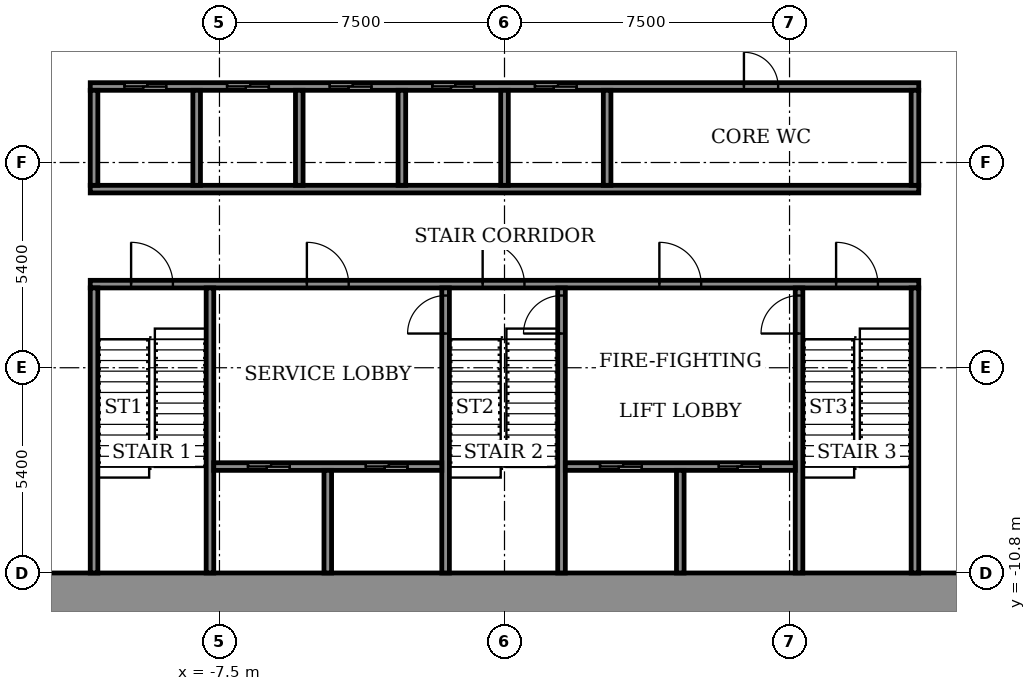
"""IFC4 building model, lengths in metres.
Left out: names, types, materials, properties, quantities, classifications, styles, units other than length and angle.
Written with IfcOpenShell. Run it as: python <this file> out.ifc"""

import sys

from ifc_helpers import new_model, si_unit, direction, frame, frame_2d, origin, place, context, subcontext, project, spatial, rectangle, extrude, element, fill, save


model = new_model("IFC4")
c1 = context("Model", 3, precision=1e-05, world=origin(), true_north=direction((0.0, 1.0)))
c2 = subcontext(c1, "Body", "Model", "MODEL_VIEW")
j1 = project(units=[si_unit("LENGTHUNIT", "METRE"), si_unit("PLANEANGLEUNIT", "RADIAN")], contexts=[c1])
p1 = place(None, origin())
s1 = spatial("IfcSite", under=j1, at=p1, CompositionType="ELEMENT")
p2 = place(p1, origin())
s2 = spatial("IfcBuilding", under=s1, at=p2, CompositionType="ELEMENT")
p3 = place(p2, frame((0.0, 0.0, 20.5)))
s3 = spatial("IfcBuildingStorey", under=s2, at=p3, CompositionType="ELEMENT", Elevation=20.5)
p4 = place(p3, frame((-15.0, -11.4, 0.0), z_axis=(0.0, 0.0, 1.0), x_axis=(1.0, 0.0, 0.0)))
e1 = element("IfcWall", 1, at=p4, inside=s3, PredefinedType="SHEAR", context=c2, shape_type="SweptSolid", body=[
    extrude(rectangle(XDim=30.0, YDim=1.2, at=frame_2d((15.0, 0.0))), origin(), (0.0, 0.0, 1.0), 4.5),
])
p5 = place(p3, frame((-10.9, -3.2, 0.0), z_axis=(0.0, 0.0, 1.0), x_axis=(1.0, 0.0, 0.0)))
e2 = element("IfcWall", 2, at=p5, inside=s3, PredefinedType="SHEAR", context=c2, shape_type="SweptSolid", body=[
    extrude(rectangle(XDim=21.8, YDim=0.2, at=frame_2d((10.9, 0.0))), origin(), (0.0, 0.0, 1.0), 3.95),
])
p6 = place(p5, frame((1.075, 0.0, 0.0)))
e3 = element("IfcOpeningElement", 3, at=p6, cuts=e2, PredefinedType="OPENING", context=c2, shape_type="SweptSolid", body=[
    extrude(rectangle(XDim=1.1, YDim=2.1, at=frame_2d((0.55, 1.05))), frame((0.0, 0.11, 0.0), z_axis=(0.0, -1.0, 0.0), x_axis=(1.0, 0.0, 0.0)), (0.0, 0.0, 1.0), 0.22),
])
p7 = place(p5, frame((10.325, 0.0, 0.0)))
e4 = element("IfcOpeningElement", 4, at=p7, cuts=e2, PredefinedType="OPENING", context=c2, shape_type="SweptSolid", body=[
    extrude(rectangle(XDim=1.1, YDim=2.1, at=frame_2d((0.55, 1.05))), frame((0.0, 0.11, 0.0), z_axis=(0.0, -1.0, 0.0), x_axis=(1.0, 0.0, 0.0)), (0.0, 0.0, 1.0), 0.22),
])
p8 = place(p5, frame((19.625, 0.0, 0.0)))
e5 = element("IfcOpeningElement", 5, at=p8, cuts=e2, PredefinedType="OPENING", context=c2, shape_type="SweptSolid", body=[
    extrude(rectangle(XDim=1.1, YDim=2.1, at=frame_2d((0.55, 1.05))), frame((0.0, 0.11, 0.0), z_axis=(0.0, -1.0, 0.0), x_axis=(1.0, 0.0, 0.0)), (0.0, 0.0, 1.0), 0.22),
])
p9 = place(p5, frame((5.7, 0.0, 0.0)))
e6 = element("IfcOpeningElement", 6, at=p9, cuts=e2, PredefinedType="OPENING", context=c2, shape_type="SweptSolid", body=[
    extrude(rectangle(XDim=1.1, YDim=2.1, at=frame_2d((0.55, 1.05))), frame((0.0, 0.11, 0.0), z_axis=(0.0, -1.0, 0.0), x_axis=(1.0, 0.0, 0.0)), (0.0, 0.0, 1.0), 0.22),
])
p10 = place(p5, frame((14.975, 0.0, 0.0)))
e7 = element("IfcOpeningElement", 7, at=p10, cuts=e2, PredefinedType="OPENING", context=c2, shape_type="SweptSolid", body=[
    extrude(rectangle(XDim=1.1, YDim=2.1, at=frame_2d((0.55, 1.05))), frame((0.0, 0.11, 0.0), z_axis=(0.0, -1.0, 0.0), x_axis=(1.0, 0.0, 0.0)), (0.0, 0.0, 1.0), 0.22),
])
p11 = place(p3, frame((-10.9, -0.7, 0.0), z_axis=(0.0, 0.0, 1.0), x_axis=(1.0, 0.0, 0.0)))
e8 = element("IfcWall", 8, at=p11, inside=s3, PredefinedType="SHEAR", context=c2, shape_type="SweptSolid", body=[
    extrude(rectangle(XDim=21.8, YDim=0.2, at=frame_2d((10.9, 0.0))), origin(), (0.0, 0.0, 1.0), 3.95),
])
p12 = place(p3, frame((-10.9, 2.0, 0.0), z_axis=(0.0, 0.0, 1.0), x_axis=(1.0, 0.0, 0.0)))
e9 = element("IfcWall", 9, at=p12, inside=s3, PredefinedType="SHEAR", context=c2, shape_type="SweptSolid", body=[
    extrude(rectangle(XDim=21.8, YDim=0.2, at=frame_2d((10.9, 0.0))), origin(), (0.0, 0.0, 1.0), 3.95),
])
p13 = place(p12, frame((0.9, 0.0, 0.0)))
e10 = element("IfcOpeningElement", 10, at=p13, cuts=e9, PredefinedType="OPENING", context=c2, shape_type="SweptSolid", body=[
    extrude(rectangle(XDim=1.1, YDim=2.1, at=frame_2d((0.55, 1.05))), frame((0.0, 0.11, 0.0), z_axis=(0.0, -1.0, 0.0), x_axis=(1.0, 0.0, 0.0)), (0.0, 0.0, 1.0), 0.22),
])
p14 = place(p12, frame((3.6, 0.0, 0.0)))
e11 = element("IfcOpeningElement", 11, at=p14, cuts=e9, PredefinedType="OPENING", context=c2, shape_type="SweptSolid", body=[
    extrude(rectangle(XDim=1.1, YDim=2.1, at=frame_2d((0.55, 1.05))), frame((0.0, 0.11, 0.0), z_axis=(0.0, -1.0, 0.0), x_axis=(1.0, 0.0, 0.0)), (0.0, 0.0, 1.0), 0.22),
])
p15 = place(p12, frame((6.3, 0.0, 0.0)))
e12 = element("IfcOpeningElement", 12, at=p15, cuts=e9, PredefinedType="OPENING", context=c2, shape_type="SweptSolid", body=[
    extrude(rectangle(XDim=1.1, YDim=2.1, at=frame_2d((0.55, 1.05))), frame((0.0, 0.11, 0.0), z_axis=(0.0, -1.0, 0.0), x_axis=(1.0, 0.0, 0.0)), (0.0, 0.0, 1.0), 0.22),
])
p16 = place(p12, frame((9.0, 0.0, 0.0)))
e13 = element("IfcOpeningElement", 13, at=p16, cuts=e9, PredefinedType="OPENING", context=c2, shape_type="SweptSolid", body=[
    extrude(rectangle(XDim=1.1, YDim=2.1, at=frame_2d((0.55, 1.05))), frame((0.0, 0.11, 0.0), z_axis=(0.0, -1.0, 0.0), x_axis=(1.0, 0.0, 0.0)), (0.0, 0.0, 1.0), 0.22),
])
p17 = place(p12, frame((11.7, 0.0, 0.0)))
e14 = element("IfcOpeningElement", 14, at=p17, cuts=e9, PredefinedType="OPENING", context=c2, shape_type="SweptSolid", body=[
    extrude(rectangle(XDim=1.1, YDim=2.1, at=frame_2d((0.55, 1.05))), frame((0.0, 0.11, 0.0), z_axis=(0.0, -1.0, 0.0), x_axis=(1.0, 0.0, 0.0)), (0.0, 0.0, 1.0), 0.22),
])
p18 = place(p12, frame((17.2, 0.0, 0.0)))
e15 = element("IfcOpeningElement", 15, at=p18, cuts=e9, PredefinedType="OPENING", context=c2, shape_type="SweptSolid", body=[
    extrude(rectangle(XDim=0.9, YDim=2.1, at=frame_2d((0.45, 1.05))), frame((0.0, 0.11, 0.0), z_axis=(0.0, -1.0, 0.0), x_axis=(1.0, 0.0, 0.0)), (0.0, 0.0, 1.0), 0.22),
])
for number, where, z_axis, x_axis in (
    (16, (-10.8, -10.8, 0.0), (0.0, 0.0, 1.0), (0.0, 1.0, 0.0)),
    (17, (-7.75, -10.8, 0.0), (0.0, 0.0, 1.0), (0.0, 1.0, 0.0)),
):
    element("IfcWall", number, at=place(p3, frame(where, z_axis=z_axis, x_axis=x_axis)), inside=s3, PredefinedType="SHEAR", context=c2, shape_type="SweptSolid", body=[
        extrude(rectangle(XDim=7.5, YDim=0.2, at=frame_2d((3.75, 0.0))), origin(), (0.0, 0.0, 1.0), 3.95),
    ])
p19 = place(p3, frame((-1.55, -10.8, 0.0), z_axis=(0.0, 0.0, 1.0), x_axis=(0.0, 1.0, 0.0)))
e18 = element("IfcWall", 18, at=p19, inside=s3, PredefinedType="SHEAR", context=c2, shape_type="SweptSolid", body=[
    extrude(rectangle(XDim=7.5, YDim=0.2, at=frame_2d((3.75, 0.0))), origin(), (0.0, 0.0, 1.0), 3.95),
])
p20 = place(p19, frame((6.3, 0.0, 0.0)))
e19 = element("IfcOpeningElement", 19, at=p20, cuts=e18, PredefinedType="OPENING", context=c2, shape_type="SweptSolid", body=[
    extrude(rectangle(XDim=1.0, YDim=2.1, at=frame_2d((0.5, 1.05))), frame((0.0, 0.11, 0.0), z_axis=(0.0, -1.0, 0.0), x_axis=(1.0, 0.0, 0.0)), (0.0, 0.0, 1.0), 0.22),
])
p21 = place(p3, frame((1.5, -10.8, 0.0), z_axis=(0.0, 0.0, 1.0), x_axis=(0.0, 1.0, 0.0)))
e20 = element("IfcWall", 20, at=p21, inside=s3, PredefinedType="SHEAR", context=c2, shape_type="SweptSolid", body=[
    extrude(rectangle(XDim=7.5, YDim=0.2, at=frame_2d((3.75, 0.0))), origin(), (0.0, 0.0, 1.0), 3.95),
])
p22 = place(p21, frame((6.3, 0.0, 0.0)))
e21 = element("IfcOpeningElement", 21, at=p22, cuts=e20, PredefinedType="OPENING", context=c2, shape_type="SweptSolid", body=[
    extrude(rectangle(XDim=1.0, YDim=2.1, at=frame_2d((0.5, 1.05))), frame((0.0, 0.11, 0.0), z_axis=(0.0, -1.0, 0.0), x_axis=(1.0, 0.0, 0.0)), (0.0, 0.0, 1.0), 0.22),
])
p23 = place(p3, frame((7.75, -10.8, 0.0), z_axis=(0.0, 0.0, 1.0), x_axis=(0.0, 1.0, 0.0)))
e22 = element("IfcWall", 22, at=p23, inside=s3, PredefinedType="SHEAR", context=c2, shape_type="SweptSolid", body=[
    extrude(rectangle(XDim=7.5, YDim=0.2, at=frame_2d((3.75, 0.0))), origin(), (0.0, 0.0, 1.0), 3.95),
])
p24 = place(p23, frame((6.3, 0.0, 0.0)))
e23 = element("IfcOpeningElement", 23, at=p24, cuts=e22, PredefinedType="OPENING", context=c2, shape_type="SweptSolid", body=[
    extrude(rectangle(XDim=1.0, YDim=2.1, at=frame_2d((0.5, 1.05))), frame((0.0, 0.11, 0.0), z_axis=(0.0, -1.0, 0.0), x_axis=(1.0, 0.0, 0.0)), (0.0, 0.0, 1.0), 0.22),
])
p25 = place(p3, frame((10.8, -10.8, 0.0), z_axis=(0.0, 0.0, 1.0), x_axis=(0.0, 1.0, 0.0)))
e24 = element("IfcWall", 24, at=p25, inside=s3, PredefinedType="SHEAR", context=c2, shape_type="SweptSolid", body=[
    extrude(rectangle(XDim=7.5, YDim=0.2, at=frame_2d((3.75, 0.0))), origin(), (0.0, 0.0, 1.0), 3.95),
])
p26 = place(p3, frame((-7.65, -8.0, 0.0), z_axis=(0.0, 0.0, 1.0), x_axis=(1.0, 0.0, 0.0)))
e25 = element("IfcWall", 25, at=p26, inside=s3, PredefinedType="SHEAR", context=c2, shape_type="SweptSolid", body=[
    extrude(rectangle(XDim=6.0, YDim=0.2, at=frame_2d((3.0, 0.0))), origin(), (0.0, 0.0, 1.0), 3.95),
])
p27 = place(p26, frame((0.9, 0.0, 0.0)))
e26 = element("IfcOpeningElement", 26, at=p27, cuts=e25, PredefinedType="OPENING", context=c2, shape_type="SweptSolid", body=[
    extrude(rectangle(XDim=1.1, YDim=2.1, at=frame_2d((0.55, 1.05))), frame((0.0, 0.11, 0.0), z_axis=(0.0, -1.0, 0.0), x_axis=(1.0, 0.0, 0.0)), (0.0, 0.0, 1.0), 0.22),
])
p28 = place(p26, frame((4.0, 0.0, 0.0)))
e27 = element("IfcOpeningElement", 27, at=p28, cuts=e25, PredefinedType="OPENING", context=c2, shape_type="SweptSolid", body=[
    extrude(rectangle(XDim=1.1, YDim=2.1, at=frame_2d((0.55, 1.05))), frame((0.0, 0.11, 0.0), z_axis=(0.0, -1.0, 0.0), x_axis=(1.0, 0.0, 0.0)), (0.0, 0.0, 1.0), 0.22),
])
p29 = place(p3, frame((-4.65, -10.8, 0.0), z_axis=(0.0, 0.0, 1.0), x_axis=(0.0, 1.0, 0.0)))
e28 = element("IfcWall", 28, at=p29, inside=s3, PredefinedType="SHEAR", context=c2, shape_type="SweptSolid", body=[
    extrude(rectangle(XDim=2.7, YDim=0.2, at=frame_2d((1.35, 0.0))), origin(), (0.0, 0.0, 1.0), 3.95),
])
p30 = place(p3, frame((1.6, -8.0, 0.0), z_axis=(0.0, 0.0, 1.0), x_axis=(1.0, 0.0, 0.0)))
e29 = element("IfcWall", 29, at=p30, inside=s3, PredefinedType="SHEAR", context=c2, shape_type="SweptSolid", body=[
    extrude(rectangle(XDim=6.05, YDim=0.2, at=frame_2d((3.025, 0.0))), origin(), (0.0, 0.0, 1.0), 3.95),
])
p31 = place(p30, frame((0.913, 0.0, 0.0)))
e30 = element("IfcOpeningElement", 30, at=p31, cuts=e29, PredefinedType="OPENING", context=c2, shape_type="SweptSolid", body=[
    extrude(rectangle(XDim=1.1, YDim=2.1, at=frame_2d((0.55, 1.05))), frame((0.0, 0.11, 0.0), z_axis=(0.0, -1.0, 0.0), x_axis=(1.0, 0.0, 0.0)), (0.0, 0.0, 1.0), 0.22),
])
p32 = place(p30, frame((4.038, 0.0, 0.0)))
e31 = element("IfcOpeningElement", 31, at=p32, cuts=e29, PredefinedType="OPENING", context=c2, shape_type="SweptSolid", body=[
    extrude(rectangle(XDim=1.1, YDim=2.1, at=frame_2d((0.55, 1.05))), frame((0.0, 0.11, 0.0), z_axis=(0.0, -1.0, 0.0), x_axis=(1.0, 0.0, 0.0)), (0.0, 0.0, 1.0), 0.22),
])
p33 = place(p3, frame((4.625, -10.8, 0.0), z_axis=(0.0, 0.0, 1.0), x_axis=(0.0, 1.0, 0.0)))
e32 = element("IfcWall", 32, at=p33, inside=s3, PredefinedType="SHEAR", context=c2, shape_type="SweptSolid", body=[
    extrude(rectangle(XDim=2.7, YDim=0.2, at=frame_2d((1.35, 0.0))), origin(), (0.0, 0.0, 1.0), 3.95),
])
for number, where, z_axis, x_axis in (
    (33, (-10.8, -0.6, 0.0), (0.0, 0.0, 1.0), (0.0, 1.0, 0.0)),
    (34, (-8.1, -0.6, 0.0), (0.0, 0.0, 1.0), (0.0, 1.0, 0.0)),
    (35, (-5.4, -0.6, 0.0), (0.0, 0.0, 1.0), (0.0, 1.0, 0.0)),
    (36, (-2.7, -0.6, 0.0), (0.0, 0.0, 1.0), (0.0, 1.0, 0.0)),
    (37, (0.0, -0.6, 0.0), (0.0, 0.0, 1.0), (0.0, 1.0, 0.0)),
    (38, (2.7, -0.6, 0.0), (0.0, 0.0, 1.0), (0.0, 1.0, 0.0)),
):
    element("IfcWall", number, at=place(p3, frame(where, z_axis=z_axis, x_axis=x_axis)), inside=s3, PredefinedType="SHEAR", context=c2, shape_type="SweptSolid", body=[
        extrude(rectangle(XDim=2.5, YDim=0.2, at=frame_2d((1.25, 0.0))), origin(), (0.0, 0.0, 1.0), 3.95),
    ])
p34 = place(p3, frame((10.8, -0.6, 0.0), z_axis=(0.0, 0.0, 1.0), x_axis=(0.0, 1.0, 0.0)))
e39 = element("IfcWall", 39, at=p34, inside=s3, PredefinedType="STANDARD", context=c2, shape_type="SweptSolid", body=[
    extrude(rectangle(XDim=2.5, YDim=0.2, at=frame_2d((1.25, 0.0))), origin(), (0.0, 0.0, 1.0), 3.95),
])
p35 = place(p13, origin())
e40 = element("IfcDoor", 40, at=p35, inside=s3, OperationType="SLIDING_TO_LEFT", PredefinedType="DOOR", context=c2, shape_type="SweptSolid", body=[
    extrude(rectangle(XDim=1.1, YDim=2.1, at=frame_2d((0.55, 1.05))), frame((0.0, 0.025, 0.0), z_axis=(0.0, -1.0, 0.0), x_axis=(1.0, 0.0, 0.0)), (0.0, 0.0, 1.0), 0.05),
])
fill(e10, e40)
p36 = place(p14, origin())
e41 = element("IfcDoor", 41, at=p36, inside=s3, OperationType="SLIDING_TO_LEFT", PredefinedType="DOOR", context=c2, shape_type="SweptSolid", body=[
    extrude(rectangle(XDim=1.1, YDim=2.1, at=frame_2d((0.55, 1.05))), frame((0.0, 0.025, 0.0), z_axis=(0.0, -1.0, 0.0), x_axis=(1.0, 0.0, 0.0)), (0.0, 0.0, 1.0), 0.05),
])
fill(e11, e41)
p37 = place(p15, origin())
e42 = element("IfcDoor", 42, at=p37, inside=s3, OperationType="SLIDING_TO_LEFT", PredefinedType="DOOR", context=c2, shape_type="SweptSolid", body=[
    extrude(rectangle(XDim=1.1, YDim=2.1, at=frame_2d((0.55, 1.05))), frame((0.0, 0.025, 0.0), z_axis=(0.0, -1.0, 0.0), x_axis=(1.0, 0.0, 0.0)), (0.0, 0.0, 1.0), 0.05),
])
fill(e12, e42)
p38 = place(p16, origin())
e43 = element("IfcDoor", 43, at=p38, inside=s3, OperationType="SLIDING_TO_LEFT", PredefinedType="DOOR", context=c2, shape_type="SweptSolid", body=[
    extrude(rectangle(XDim=1.1, YDim=2.1, at=frame_2d((0.55, 1.05))), frame((0.0, 0.025, 0.0), z_axis=(0.0, -1.0, 0.0), x_axis=(1.0, 0.0, 0.0)), (0.0, 0.0, 1.0), 0.05),
])
fill(e13, e43)
p39 = place(p17, origin())
e44 = element("IfcDoor", 44, at=p39, inside=s3, OperationType="SLIDING_TO_LEFT", PredefinedType="DOOR", context=c2, shape_type="SweptSolid", body=[
    extrude(rectangle(XDim=1.1, YDim=2.1, at=frame_2d((0.55, 1.05))), frame((0.0, 0.025, 0.0), z_axis=(0.0, -1.0, 0.0), x_axis=(1.0, 0.0, 0.0)), (0.0, 0.0, 1.0), 0.05),
])
fill(e14, e44)
p40 = place(p18, origin())
e45 = element("IfcDoor", 45, at=p40, inside=s3, OperationType="SINGLE_SWING_RIGHT", PredefinedType="DOOR", context=c2, shape_type="SweptSolid", body=[
    extrude(rectangle(XDim=0.9, YDim=2.1, at=frame_2d((0.45, 1.05))), frame((0.0, 0.025, 0.0), z_axis=(0.0, -1.0, 0.0), x_axis=(1.0, 0.0, 0.0)), (0.0, 0.0, 1.0), 0.05),
])
fill(e15, e45)
p41 = place(p31, origin())
e46 = element("IfcDoor", 46, at=p41, inside=s3, OperationType="SLIDING_TO_LEFT", PredefinedType="DOOR", context=c2, shape_type="SweptSolid", body=[
    extrude(rectangle(XDim=1.1, YDim=2.1, at=frame_2d((0.55, 1.05))), frame((0.0, 0.025, 0.0), z_axis=(0.0, -1.0, 0.0), x_axis=(1.0, 0.0, 0.0)), (0.0, 0.0, 1.0), 0.05),
])
fill(e30, e46)
p42 = place(p27, origin())
e47 = element("IfcDoor", 47, at=p42, inside=s3, OperationType="SLIDING_TO_LEFT", PredefinedType="DOOR", context=c2, shape_type="SweptSolid", body=[
    extrude(rectangle(XDim=1.1, YDim=2.1, at=frame_2d((0.55, 1.05))), frame((0.0, 0.025, 0.0), z_axis=(0.0, -1.0, 0.0), x_axis=(1.0, 0.0, 0.0)), (0.0, 0.0, 1.0), 0.05),
])
fill(e26, e47)
p43 = place(p32, origin())
e48 = element("IfcDoor", 48, at=p43, inside=s3, OperationType="SLIDING_TO_LEFT", PredefinedType="DOOR", context=c2, shape_type="SweptSolid", body=[
    extrude(rectangle(XDim=1.1, YDim=2.1, at=frame_2d((0.55, 1.05))), frame((0.0, 0.025, 0.0), z_axis=(0.0, -1.0, 0.0), x_axis=(1.0, 0.0, 0.0)), (0.0, 0.0, 1.0), 0.05),
])
fill(e31, e48)
p44 = place(p28, origin())
e49 = element("IfcDoor", 49, at=p44, inside=s3, OperationType="SLIDING_TO_LEFT", PredefinedType="DOOR", context=c2, shape_type="SweptSolid", body=[
    extrude(rectangle(XDim=1.1, YDim=2.1, at=frame_2d((0.55, 1.05))), frame((0.0, 0.025, 0.0), z_axis=(0.0, -1.0, 0.0), x_axis=(1.0, 0.0, 0.0)), (0.0, 0.0, 1.0), 0.05),
])
fill(e27, e49)
p45 = place(p6, origin())
e50 = element("IfcDoor", 50, at=p45, inside=s3, OperationType="SINGLE_SWING_RIGHT", PredefinedType="DOOR", context=c2, shape_type="SweptSolid", body=[
    extrude(rectangle(XDim=1.1, YDim=2.1, at=frame_2d((0.55, 1.05))), frame((0.0, 0.025, 0.0), z_axis=(0.0, -1.0, 0.0), x_axis=(1.0, 0.0, 0.0)), (0.0, 0.0, 1.0), 0.05),
])
fill(e3, e50)
p46 = place(p7, origin())
e51 = element("IfcDoor", 51, at=p46, inside=s3, OperationType="SINGLE_SWING_RIGHT", PredefinedType="DOOR", context=c2, shape_type="SweptSolid", body=[
    extrude(rectangle(XDim=1.1, YDim=2.1, at=frame_2d((0.55, 1.05))), frame((0.0, 0.025, 0.0), z_axis=(0.0, -1.0, 0.0), x_axis=(1.0, 0.0, 0.0)), (0.0, 0.0, 1.0), 0.05),
])
fill(e4, e51)
p47 = place(p8, origin())
e52 = element("IfcDoor", 52, at=p47, inside=s3, OperationType="SINGLE_SWING_RIGHT", PredefinedType="DOOR", context=c2, shape_type="SweptSolid", body=[
    extrude(rectangle(XDim=1.1, YDim=2.1, at=frame_2d((0.55, 1.05))), frame((0.0, 0.025, 0.0), z_axis=(0.0, -1.0, 0.0), x_axis=(1.0, 0.0, 0.0)), (0.0, 0.0, 1.0), 0.05),
])
fill(e5, e52)
p48 = place(p9, origin())
e53 = element("IfcDoor", 53, at=p48, inside=s3, OperationType="SINGLE_SWING_LEFT", PredefinedType="DOOR", context=c2, shape_type="SweptSolid", body=[
    extrude(rectangle(XDim=1.1, YDim=2.1, at=frame_2d((0.55, 1.05))), frame((0.0, 0.025, 0.0), z_axis=(0.0, -1.0, 0.0), x_axis=(1.0, 0.0, 0.0)), (0.0, 0.0, 1.0), 0.05),
])
fill(e6, e53)
p49 = place(p10, origin())
e54 = element("IfcDoor", 54, at=p49, inside=s3, OperationType="SINGLE_SWING_LEFT", PredefinedType="DOOR", context=c2, shape_type="SweptSolid", body=[
    extrude(rectangle(XDim=1.1, YDim=2.1, at=frame_2d((0.55, 1.05))), frame((0.0, 0.025, 0.0), z_axis=(0.0, -1.0, 0.0), x_axis=(1.0, 0.0, 0.0)), (0.0, 0.0, 1.0), 0.05),
])
fill(e7, e54)
p50 = place(p20, origin())
e55 = element("IfcDoor", 55, at=p50, inside=s3, OperationType="SINGLE_SWING_RIGHT", PredefinedType="DOOR", context=c2, shape_type="SweptSolid", body=[
    extrude(rectangle(XDim=1.0, YDim=2.1, at=frame_2d((0.5, 1.05))), frame((0.0, 0.025, 0.0), z_axis=(0.0, -1.0, 0.0), x_axis=(1.0, 0.0, 0.0)), (0.0, 0.0, 1.0), 0.05),
])
fill(e19, e55)
p51 = place(p22, origin())
e56 = element("IfcDoor", 56, at=p51, inside=s3, OperationType="SINGLE_SWING_RIGHT", PredefinedType="DOOR", context=c2, shape_type="SweptSolid", body=[
    extrude(rectangle(XDim=1.0, YDim=2.1, at=frame_2d((0.5, 1.05))), frame((0.0, 0.025, 0.0), z_axis=(0.0, -1.0, 0.0), x_axis=(1.0, 0.0, 0.0)), (0.0, 0.0, 1.0), 0.05),
])
fill(e21, e56)
p52 = place(p24, origin())
e57 = element("IfcDoor", 57, at=p52, inside=s3, OperationType="SINGLE_SWING_RIGHT", PredefinedType="DOOR", context=c2, shape_type="SweptSolid", body=[
    extrude(rectangle(XDim=1.0, YDim=2.1, at=frame_2d((0.5, 1.05))), frame((0.0, 0.025, 0.0), z_axis=(0.0, -1.0, 0.0), x_axis=(1.0, 0.0, 0.0)), (0.0, 0.0, 1.0), 0.05),
])
fill(e23, e57)
save(model, sys.argv[1])
